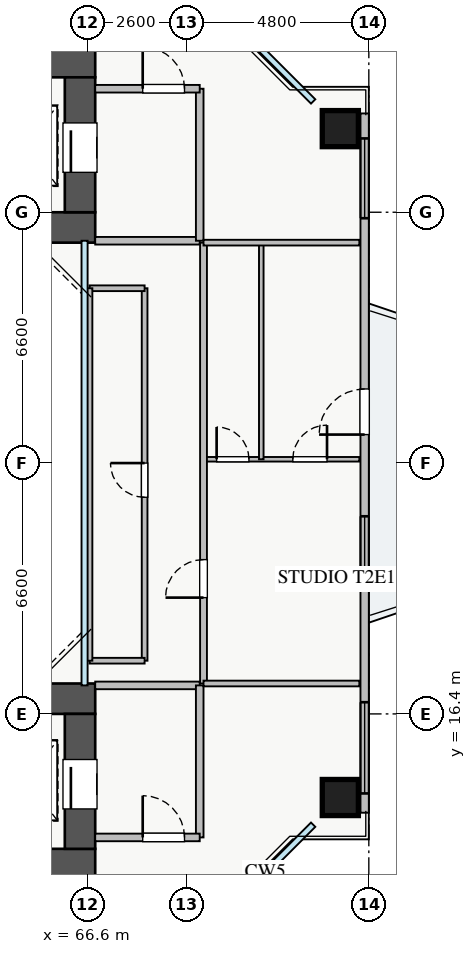
"""IFC4 building model, lengths in metres.
Left out: names, types, materials, properties, quantities, classifications, styles, units other than length and angle.
Written with IfcOpenShell. Run it as: python <this file> out.ifc"""

import sys

from ifc_helpers import new_model, si_unit, direction, frame, frame_2d, origin, origin_2d, place, context, subcontext, project, spatial, rectangle, extrude, source, transform, mapped, element, fill, save


model = new_model("IFC4")
c1 = context("Model", 3, precision=1e-05, world=origin(), true_north=direction((0.0, 1.0)))
c2 = subcontext(c1, "Body", "Model", "MODEL_VIEW")
j1 = project(units=[si_unit("LENGTHUNIT", "METRE"), si_unit("PLANEANGLEUNIT", "RADIAN")], contexts=[c1])
p1 = place(None, origin())
s1 = spatial("IfcSite", under=j1, at=p1, CompositionType="ELEMENT")
p2 = place(p1, origin())
s2 = spatial("IfcBuilding", under=s1, at=p2, CompositionType="ELEMENT")
p3 = place(p2, frame((0.0, 0.0, 53.5)))
s3 = spatial("IfcBuildingStorey", under=s2, at=p3, CompositionType="ELEMENT", Elevation=53.5)
p4 = place(p3, frame((54.2, 29.2, 0.0), z_axis=(0.0, 0.0, 1.0), x_axis=(1.0, 0.0, 0.0)))
e1 = element("IfcWall", 1, at=p4, inside=s3, PredefinedType="SHEAR", context=c2, shape_type="SweptSolid", body=[
    extrude(rectangle(XDim=12.6, YDim=0.8, at=frame_2d((6.3, 0.0))), origin(), (0.0, 0.0, 1.0), 3.25),
])
p5 = place(p3, frame((54.2, 33.55, 0.0), z_axis=(0.0, 0.0, 1.0), x_axis=(1.0, 0.0, 0.0)))
e2 = element("IfcWall", 2, at=p5, inside=s3, PredefinedType="SHEAR", context=c2, shape_type="SweptSolid", body=[
    extrude(rectangle(XDim=12.6, YDim=0.8, at=frame_2d((6.3, 0.0))), origin(), (0.0, 0.0, 1.0), 3.25),
])
p6 = place(p5, frame((8.2, 0.0, 0.0)))
e3 = element("IfcOpeningElement", 3, at=p6, cuts=e2, PredefinedType="OPENING", context=c2, shape_type="SweptSolid", body=[
    extrude(rectangle(XDim=1.1, YDim=2.05, at=frame_2d((0.55, 1.025))), frame((0.0, 0.41, 0.0), z_axis=(0.0, -1.0, 0.0), x_axis=(1.0, 0.0, 0.0)), (0.0, 0.0, 1.0), 0.82),
])
p7 = place(p3, frame((66.4, 29.6, 0.0), z_axis=(0.0, 0.0, 1.0), x_axis=(0.0, 1.0, 0.0)))
e4 = element("IfcWall", 4, at=p7, inside=s3, PredefinedType="SHEAR", context=c2, shape_type="SweptSolid", body=[
    extrude(rectangle(XDim=3.55, YDim=0.8, at=frame_2d((1.775, 0.0))), origin(), (0.0, 0.0, 1.0), 3.25),
])
p8 = place(p7, frame((1.05, 0.0, 0.0)))
e5 = element("IfcOpeningElement", 5, at=p8, cuts=e4, PredefinedType="OPENING", context=c2, shape_type="SweptSolid", body=[
    extrude(rectangle(XDim=1.3, YDim=2.05, at=frame_2d((0.65, 1.025))), frame((0.0, 0.41, 0.0), z_axis=(0.0, -1.0, 0.0), x_axis=(1.0, 0.0, 0.0)), (0.0, 0.0, 1.0), 0.82),
])
p9 = place(p3, frame((54.2, 12.45, 0.0), z_axis=(0.0, 0.0, 1.0), x_axis=(1.0, 0.0, 0.0)))
e6 = element("IfcWall", 6, at=p9, inside=s3, PredefinedType="SHEAR", context=c2, shape_type="SweptSolid", body=[
    extrude(rectangle(XDim=12.6, YDim=0.8, at=frame_2d((6.3, 0.0))), origin(), (0.0, 0.0, 1.0), 3.25),
])
p10 = place(p9, frame((8.2, 0.0, 0.0)))
e7 = element("IfcOpeningElement", 7, at=p10, cuts=e6, PredefinedType="OPENING", context=c2, shape_type="SweptSolid", body=[
    extrude(rectangle(XDim=1.1, YDim=2.05, at=frame_2d((0.55, 1.025))), frame((0.0, 0.41, 0.0), z_axis=(0.0, -1.0, 0.0), x_axis=(1.0, 0.0, 0.0)), (0.0, 0.0, 1.0), 0.82),
])
p11 = place(p3, frame((54.2, 16.8, 0.0), z_axis=(0.0, 0.0, 1.0), x_axis=(1.0, 0.0, 0.0)))
e8 = element("IfcWall", 8, at=p11, inside=s3, PredefinedType="SHEAR", context=c2, shape_type="SweptSolid", body=[
    extrude(rectangle(XDim=12.6, YDim=0.8, at=frame_2d((6.3, 0.0))), origin(), (0.0, 0.0, 1.0), 3.25),
])
p12 = place(p3, frame((66.4, 12.85, 0.0), z_axis=(0.0, 0.0, 1.0), x_axis=(0.0, 1.0, 0.0)))
e9 = element("IfcWall", 9, at=p12, inside=s3, PredefinedType="SHEAR", context=c2, shape_type="SweptSolid", body=[
    extrude(rectangle(XDim=3.55, YDim=0.8, at=frame_2d((1.775, 0.0))), origin(), (0.0, 0.0, 1.0), 3.25),
])
p13 = place(p12, frame((1.05, 0.0, 0.0)))
e10 = element("IfcOpeningElement", 10, at=p13, cuts=e9, PredefinedType="OPENING", context=c2, shape_type="SweptSolid", body=[
    extrude(rectangle(XDim=1.3, YDim=2.05, at=frame_2d((0.65, 1.025))), frame((0.0, 0.41, 0.0), z_axis=(0.0, -1.0, 0.0), x_axis=(1.0, 0.0, 0.0)), (0.0, 0.0, 1.0), 0.82),
])
m1 = source(origin(), c2, "Body", "SweptSolid", [
    extrude(rectangle(XDim=0.95, YDim=0.95, at=origin_2d()), origin(), (0.0, 0.0, 1.0), 3.25),
])
for number, where, z_axis, x_axis in (
    (11, (73.25, 14.2, 0.0), (0.0, 0.0, 1.0), (1.0, 0.0, 0.0)),
    (12, (73.25, 31.8, 0.0), (0.0, 0.0, 1.0), (1.0, 0.0, 0.0)),
):
    element("IfcColumn", number, at=place(p3, frame(where, z_axis=z_axis, x_axis=x_axis)), inside=s3, PredefinedType="COLUMN", context=c2, shape_type="MappedRepresentation", body=[
        mapped(m1, transform((0.0, 0.0, 0.0), x_axis=(1.0, 0.0, 0.0), y_axis=(0.0, 1.0, 0.0), z_axis=(0.0, 0.0, 1.0), scale=1.0)),
    ])
p14 = place(p3, frame((73.89, 13.8, 0.0), z_axis=(0.0, 0.0, 1.0), x_axis=(0.0, 1.0, 0.0)))
e13 = element("IfcWall", 13, at=p14, inside=s3, PredefinedType="STANDARD", context=c2, shape_type="SweptSolid", body=[
    extrude(rectangle(XDim=18.4, YDim=0.22, at=frame_2d((9.2, 0.0))), origin(), (0.0, 0.0, 1.0), 2.61),
])
p15 = place(p14, frame((9.95, 0.0, 0.0)))
e14 = element("IfcOpeningElement", 14, at=p15, cuts=e13, PredefinedType="OPENING", context=c2, shape_type="SweptSolid", body=[
    extrude(rectangle(XDim=1.2, YDim=2.1, at=frame_2d((0.6, 1.05))), frame((0.0, 0.12, 0.0), z_axis=(0.0, -1.0, 0.0), x_axis=(1.0, 0.0, 0.0)), (0.0, 0.0, 1.0), 0.24),
])
p16 = place(p14, frame((0.508, 0.0, 0.9)))
e15 = element("IfcOpeningElement", 15, at=p16, cuts=e13, PredefinedType="OPENING", context=c2, shape_type="SweptSolid", body=[
    extrude(rectangle(XDim=2.4, YDim=1.5, at=frame_2d((1.2, 0.75))), frame((0.0, 0.12, 0.0), z_axis=(0.0, -1.0, 0.0), x_axis=(1.0, 0.0, 0.0)), (0.0, 0.0, 1.0), 0.24),
])
p17 = place(p14, frame((6.0, 0.0, 0.9)))
e16 = element("IfcOpeningElement", 16, at=p17, cuts=e13, PredefinedType="OPENING", context=c2, shape_type="SweptSolid", body=[
    extrude(rectangle(XDim=1.8, YDim=1.45, at=frame_2d((0.9, 0.725))), frame((0.0, 0.12, 0.0), z_axis=(0.0, -1.0, 0.0), x_axis=(1.0, 0.0, 0.0)), (0.0, 0.0, 1.0), 0.24),
])
p18 = place(p14, frame((15.643, 0.0, 0.9)))
e17 = element("IfcOpeningElement", 17, at=p18, cuts=e13, PredefinedType="OPENING", context=c2, shape_type="SweptSolid", body=[
    extrude(rectangle(XDim=2.1, YDim=1.5, at=frame_2d((1.05, 0.75))), frame((0.0, 0.12, 0.0), z_axis=(0.0, -1.0, 0.0), x_axis=(1.0, 0.0, 0.0)), (0.0, 0.0, 1.0), 0.24),
])
p19 = place(p3, frame((66.8, 28.85, 0.0), z_axis=(0.0, 0.0, 1.0), x_axis=(1.0, 0.0, 0.0)))
e18 = element("IfcWall", 18, at=p19, inside=s3, PredefinedType="PARTITIONING", context=c2, shape_type="SweptSolid", body=[
    extrude(rectangle(XDim=2.75, YDim=0.2, at=frame_2d((1.375, 0.0))), origin(), (0.0, 0.0, 1.0), 3.07),
])
p20 = place(p3, frame((69.55, 28.85, 0.0), z_axis=(0.0, 0.0, 1.0), x_axis=(0.0, 1.0, 0.0)))
e19 = element("IfcWall", 19, at=p20, inside=s3, PredefinedType="PARTITIONING", context=c2, shape_type="SweptSolid", body=[
    extrude(rectangle(XDim=4.0, YDim=0.2, at=frame_2d((2.0, 0.0))), origin(), (0.0, 0.0, 1.0), 2.615),
])
p21 = place(p3, frame((66.8, 32.85, 0.0), z_axis=(0.0, 0.0, 1.0), x_axis=(1.0, 0.0, 0.0)))
e20 = element("IfcWall", 20, at=p21, inside=s3, PredefinedType="PARTITIONING", context=c2, shape_type="SweptSolid", body=[
    extrude(rectangle(XDim=2.75, YDim=0.2, at=frame_2d((1.375, 0.0))), origin(), (0.0, 0.0, 1.0), 3.07),
])
p22 = place(p21, frame((1.25, 0.0, 0.0)))
e21 = element("IfcOpeningElement", 21, at=p22, cuts=e20, PredefinedType="OPENING", context=c2, shape_type="SweptSolid", body=[
    extrude(rectangle(XDim=1.1, YDim=2.05, at=frame_2d((0.55, 1.025))), frame((0.0, 0.11, 0.0), z_axis=(0.0, -1.0, 0.0), x_axis=(1.0, 0.0, 0.0)), (0.0, 0.0, 1.0), 0.22),
])
p23 = place(p3, frame((66.8, 17.15, 0.0), z_axis=(0.0, 0.0, 1.0), x_axis=(1.0, 0.0, 0.0)))
e22 = element("IfcWall", 22, at=p23, inside=s3, PredefinedType="PARTITIONING", context=c2, shape_type="SweptSolid", body=[
    extrude(rectangle(XDim=2.75, YDim=0.2, at=frame_2d((1.375, 0.0))), origin(), (0.0, 0.0, 1.0), 3.07),
])
p24 = place(p3, frame((69.55, 13.15, 0.0), z_axis=(0.0, 0.0, 1.0), x_axis=(0.0, 1.0, 0.0)))
e23 = element("IfcWall", 23, at=p24, inside=s3, PredefinedType="PARTITIONING", context=c2, shape_type="SweptSolid", body=[
    extrude(rectangle(XDim=4.0, YDim=0.2, at=frame_2d((2.0, 0.0))), origin(), (0.0, 0.0, 1.0), 2.615),
])
p25 = place(p3, frame((66.8, 13.15, 0.0), z_axis=(0.0, 0.0, 1.0), x_axis=(1.0, 0.0, 0.0)))
e24 = element("IfcWall", 24, at=p25, inside=s3, PredefinedType="PARTITIONING", context=c2, shape_type="SweptSolid", body=[
    extrude(rectangle(XDim=2.75, YDim=0.2, at=frame_2d((1.375, 0.0))), origin(), (0.0, 0.0, 1.0), 3.07),
])
p26 = place(p25, frame((1.25, 0.0, 0.0)))
e25 = element("IfcOpeningElement", 25, at=p26, cuts=e24, PredefinedType="OPENING", context=c2, shape_type="SweptSolid", body=[
    extrude(rectangle(XDim=1.1, YDim=2.05, at=frame_2d((0.55, 1.025))), frame((0.0, 0.11, 0.0), z_axis=(0.0, -1.0, 0.0), x_axis=(1.0, 0.0, 0.0)), (0.0, 0.0, 1.0), 0.22),
])
p27 = place(p3, frame((69.65, 23.1, 0.0), z_axis=(0.0, 0.0, 1.0), x_axis=(1.0, 0.0, 0.0)))
e26 = element("IfcWall", 26, at=p27, inside=s3, PredefinedType="PLUMBINGWALL", context=c2, shape_type="SweptSolid", body=[
    extrude(rectangle(XDim=4.1, YDim=0.12, at=frame_2d((2.05, 0.0))), origin(), (0.0, 0.0, 1.0), 2.865),
])
p28 = place(p27, frame((0.345, 0.0, 0.0)))
e27 = element("IfcOpeningElement", 27, at=p28, cuts=e26, PredefinedType="OPENING", context=c2, shape_type="SweptSolid", body=[
    extrude(rectangle(XDim=0.85, YDim=2.05, at=frame_2d((0.425, 1.025))), frame((0.0, 0.07, 0.0), z_axis=(0.0, -1.0, 0.0), x_axis=(1.0, 0.0, 0.0)), (0.0, 0.0, 1.0), 0.14),
])
p29 = place(p27, frame((2.35, 0.0, 0.0)))
e28 = element("IfcOpeningElement", 28, at=p29, cuts=e26, PredefinedType="OPENING", context=c2, shape_type="SweptSolid", body=[
    extrude(rectangle(XDim=0.9, YDim=2.05, at=frame_2d((0.45, 1.025))), frame((0.0, 0.07, 0.0), z_axis=(0.0, -1.0, 0.0), x_axis=(1.0, 0.0, 0.0)), (0.0, 0.0, 1.0), 0.14),
])
p30 = place(p3, frame((71.17, 23.1, 0.0), z_axis=(0.0, 0.0, 1.0), x_axis=(0.0, 1.0, 0.0)))
e29 = element("IfcWall", 29, at=p30, inside=s3, PredefinedType="PLUMBINGWALL", context=c2, shape_type="SweptSolid", body=[
    extrude(rectangle(XDim=5.7, YDim=0.12, at=frame_2d((2.85, 0.0))), origin(), (0.0, 0.0, 1.0), 3.07),
])
p31 = place(p3, frame((69.65, 17.2, 0.0), z_axis=(0.0, 0.0, 1.0), x_axis=(0.0, 1.0, 0.0)))
e30 = element("IfcWall", 30, at=p31, inside=s3, PredefinedType="PARTITIONING", context=c2, shape_type="SweptSolid", body=[
    extrude(rectangle(XDim=11.6, YDim=0.18, at=frame_2d((5.8, 0.0))), origin(), (0.0, 0.0, 1.0), 3.07),
])
p32 = place(p31, frame((2.26, 0.0, 0.0)))
e31 = element("IfcOpeningElement", 31, at=p32, cuts=e30, PredefinedType="OPENING", context=c2, shape_type="SweptSolid", body=[
    extrude(rectangle(XDim=1.0, YDim=2.05, at=frame_2d((0.5, 1.025))), frame((0.0, 0.1, 0.0), z_axis=(0.0, -1.0, 0.0), x_axis=(1.0, 0.0, 0.0)), (0.0, 0.0, 1.0), 0.2),
])
for number, where, z_axis, x_axis in (
    (32, (69.65, 17.2, 0.0), (0.0, 0.0, 1.0), (1.0, 0.0, 0.0)),
    (33, (69.65, 28.8, 0.0), (0.0, 0.0, 1.0), (1.0, 0.0, 0.0)),
):
    element("IfcWall", number, at=place(p3, frame(where, z_axis=z_axis, x_axis=x_axis)), inside=s3, PredefinedType="PARTITIONING", context=c2, shape_type="SweptSolid", body=[
        extrude(rectangle(XDim=4.1, YDim=0.15, at=frame_2d((2.05, 0.0))), origin(), (0.0, 0.0, 1.0), 3.07),
    ])
p33 = place(p3, frame((68.1, 17.8, 0.0), z_axis=(0.0, 0.0, 1.0), x_axis=(0.0, 1.0, 0.0)))
e34 = element("IfcWall", 34, at=p33, inside=s3, PredefinedType="PARTITIONING", context=c2, shape_type="SweptSolid", body=[
    extrude(rectangle(XDim=9.8, YDim=0.15, at=frame_2d((4.9, 0.0))), origin(), (0.0, 0.0, 1.0), 3.07),
])
p34 = place(p33, frame((4.3, 0.0, 0.0)))
e35 = element("IfcOpeningElement", 35, at=p34, cuts=e34, PredefinedType="OPENING", context=c2, shape_type="SweptSolid", body=[
    extrude(rectangle(XDim=0.9, YDim=2.05, at=frame_2d((0.45, 1.025))), frame((0.0, 0.085, 0.0), z_axis=(0.0, -1.0, 0.0), x_axis=(1.0, 0.0, 0.0)), (0.0, 0.0, 1.0), 0.17),
])
p35 = place(p3, frame((66.65, 27.6, 0.0), z_axis=(0.0, 0.0, 1.0), x_axis=(1.0, 0.0, 0.0)))
e36 = element("IfcWall", 36, at=p35, inside=s3, PredefinedType="PARTITIONING", context=c2, shape_type="SweptSolid", body=[
    extrude(rectangle(XDim=1.45, YDim=0.15, at=frame_2d((0.725, 0.0))), origin(), (0.0, 0.0, 1.0), 2.865),
])
p36 = place(p3, frame((66.65, 17.8, 0.0), z_axis=(0.0, 0.0, 1.0), x_axis=(1.0, 0.0, 0.0)))
e37 = element("IfcWall", 37, at=p36, inside=s3, PredefinedType="PARTITIONING", context=c2, shape_type="SweptSolid", body=[
    extrude(rectangle(XDim=1.45, YDim=0.15, at=frame_2d((0.725, 0.0))), origin(), (0.0, 0.0, 1.0), 3.07),
])
p37 = place(p3, frame((66.65, 17.8, 0.0), z_axis=(0.0, 0.0, 1.0), x_axis=(0.0, 1.0, 0.0)))
e38 = element("IfcWall", 38, at=p37, inside=s3, PredefinedType="PARTITIONING", context=c2, shape_type="SweptSolid", body=[
    extrude(rectangle(XDim=9.8, YDim=0.15, at=frame_2d((4.9, 0.0))), origin(), (0.0, 0.0, 1.0), 2.665),
])
m2 = source(origin(), c2, "Body", "SweptSolid", [
    extrude(rectangle(XDim=1.2, YDim=2.1, at=frame_2d((0.6, 1.05))), frame((0.0, 0.025, 0.0), z_axis=(0.0, -1.0, 0.0), x_axis=(1.0, 0.0, 0.0)), (0.0, 0.0, 1.0), 0.05),
])
p38 = place(p15, origin())
e39 = element("IfcDoor", 39, at=p38, inside=s3, OperationType="SINGLE_SWING_LEFT", PredefinedType="DOOR", context=c2, shape_type="MappedRepresentation", body=[
    mapped(m2, transform((0.0, 0.0, 0.0), x_axis=(1.0, 0.0, 0.0), y_axis=(0.0, 1.0, 0.0), z_axis=(0.0, 0.0, 1.0), scale=1.0)),
])
fill(e14, e39)
m3 = source(origin(), c2, "Body", "SweptSolid", [
    extrude(rectangle(XDim=2.4, YDim=1.5, at=frame_2d((1.2, 0.75))), frame((0.0, 0.03, 0.0), z_axis=(0.0, -1.0, 0.0), x_axis=(1.0, 0.0, 0.0)), (0.0, 0.0, 1.0), 0.06),
])
p39 = place(p16, origin())
e40 = element("IfcWindow", 40, at=p39, inside=s3, PartitioningType="TRIPLE_PANEL_VERTICAL", PredefinedType="WINDOW", context=c2, shape_type="MappedRepresentation", body=[
    mapped(m3, transform((0.0, 0.0, 0.0), x_axis=(1.0, 0.0, 0.0), y_axis=(0.0, 1.0, 0.0), z_axis=(0.0, 0.0, 1.0), scale=1.0)),
])
fill(e15, e40)
m4 = source(origin(), c2, "Body", "SweptSolid", [
    extrude(rectangle(XDim=1.8, YDim=1.45, at=frame_2d((0.9, 0.725))), frame((0.0, 0.03, 0.0), z_axis=(0.0, -1.0, 0.0), x_axis=(1.0, 0.0, 0.0)), (0.0, 0.0, 1.0), 0.06),
])
p40 = place(p17, origin())
e41 = element("IfcWindow", 41, at=p40, inside=s3, PartitioningType="DOUBLE_PANEL_VERTICAL", PredefinedType="WINDOW", context=c2, shape_type="MappedRepresentation", body=[
    mapped(m4, transform((0.0, 0.0, 0.0), x_axis=(1.0, 0.0, 0.0), y_axis=(0.0, 1.0, 0.0), z_axis=(0.0, 0.0, 1.0), scale=1.0)),
])
fill(e16, e41)
m5 = source(origin(), c2, "Body", "SweptSolid", [
    extrude(rectangle(XDim=2.1, YDim=1.5, at=frame_2d((1.05, 0.75))), frame((0.0, 0.03, 0.0), z_axis=(0.0, -1.0, 0.0), x_axis=(1.0, 0.0, 0.0)), (0.0, 0.0, 1.0), 0.06),
])
p41 = place(p18, origin())
e42 = element("IfcWindow", 42, at=p41, inside=s3, PartitioningType="TRIPLE_PANEL_VERTICAL", PredefinedType="WINDOW", context=c2, shape_type="MappedRepresentation", body=[
    mapped(m5, transform((0.0, 0.0, 0.0), x_axis=(1.0, 0.0, 0.0), y_axis=(0.0, 1.0, 0.0), z_axis=(0.0, 0.0, 1.0), scale=1.0)),
])
fill(e17, e42)
m6 = source(origin(), c2, "Body", "SweptSolid", [
    extrude(rectangle(XDim=1.3, YDim=2.05, at=frame_2d((0.65, 1.025))), frame((0.0, 0.025, 0.0), z_axis=(0.0, -1.0, 0.0), x_axis=(1.0, 0.0, 0.0)), (0.0, 0.0, 1.0), 0.05),
])
p42 = place(p8, origin())
e43 = element("IfcDoor", 43, at=p42, inside=s3, OperationType="SLIDING_TO_LEFT", PredefinedType="DOOR", context=c2, shape_type="MappedRepresentation", body=[
    mapped(m6, transform((0.0, 0.0, 0.0), x_axis=(1.0, 0.0, 0.0), y_axis=(0.0, 1.0, 0.0), z_axis=(0.0, 0.0, 1.0), scale=1.0)),
])
fill(e5, e43)
p43 = place(p13, origin())
e44 = element("IfcDoor", 44, at=p43, inside=s3, OperationType="SLIDING_TO_RIGHT", PredefinedType="DOOR", context=c2, shape_type="MappedRepresentation", body=[
    mapped(m6, transform((0.0, 0.0, 0.0), x_axis=(1.0, 0.0, 0.0), y_axis=(0.0, 1.0, 0.0), z_axis=(0.0, 0.0, 1.0), scale=1.0)),
])
fill(e10, e44)
m7 = source(origin(), c2, "Body", "SweptSolid", [
    extrude(rectangle(XDim=1.1, YDim=2.05, at=frame_2d((0.55, 1.025))), frame((0.0, 0.025, 0.0), z_axis=(0.0, -1.0, 0.0), x_axis=(1.0, 0.0, 0.0)), (0.0, 0.0, 1.0), 0.05),
])
p44 = place(p22, origin())
e45 = element("IfcDoor", 45, at=p44, inside=s3, OperationType="SINGLE_SWING_LEFT", PredefinedType="DOOR", context=c2, shape_type="MappedRepresentation", body=[
    mapped(m7, transform((0.0, 0.0, 0.0), x_axis=(1.0, 0.0, 0.0), y_axis=(0.0, 1.0, 0.0), z_axis=(0.0, 0.0, 1.0), scale=1.0)),
])
fill(e21, e45)
p45 = place(p26, origin())
e46 = element("IfcDoor", 46, at=p45, inside=s3, OperationType="SINGLE_SWING_LEFT", PredefinedType="DOOR", context=c2, shape_type="MappedRepresentation", body=[
    mapped(m7, transform((0.0, 0.0, 0.0), x_axis=(1.0, 0.0, 0.0), y_axis=(0.0, 1.0, 0.0), z_axis=(0.0, 0.0, 1.0), scale=1.0)),
])
fill(e25, e46)
m8 = source(origin(), c2, "Body", "SweptSolid", [
    extrude(rectangle(XDim=0.85, YDim=2.05, at=frame_2d((0.425, 1.025))), frame((0.0, 0.025, 0.0), z_axis=(0.0, -1.0, 0.0), x_axis=(1.0, 0.0, 0.0)), (0.0, 0.0, 1.0), 0.05),
])
p46 = place(p28, origin())
e47 = element("IfcDoor", 47, at=p46, inside=s3, OperationType="SINGLE_SWING_LEFT", PredefinedType="DOOR", context=c2, shape_type="MappedRepresentation", body=[
    mapped(m8, transform((0.0, 0.0, 0.0), x_axis=(1.0, 0.0, 0.0), y_axis=(0.0, 1.0, 0.0), z_axis=(0.0, 0.0, 1.0), scale=1.0)),
])
fill(e27, e47)
m9 = source(origin(), c2, "Body", "SweptSolid", [
    extrude(rectangle(XDim=0.9, YDim=2.05, at=frame_2d((0.45, 1.025))), frame((0.0, 0.025, 0.0), z_axis=(0.0, -1.0, 0.0), x_axis=(1.0, 0.0, 0.0)), (0.0, 0.0, 1.0), 0.05),
])
p47 = place(p29, origin())
e48 = element("IfcDoor", 48, at=p47, inside=s3, OperationType="SINGLE_SWING_RIGHT", PredefinedType="DOOR", context=c2, shape_type="MappedRepresentation", body=[
    mapped(m9, transform((0.0, 0.0, 0.0), x_axis=(1.0, 0.0, 0.0), y_axis=(0.0, 1.0, 0.0), z_axis=(0.0, 0.0, 1.0), scale=1.0)),
])
fill(e28, e48)
m10 = source(origin(), c2, "Body", "SweptSolid", [
    extrude(rectangle(XDim=1.0, YDim=2.05, at=frame_2d((0.5, 1.025))), frame((0.0, 0.025, 0.0), z_axis=(0.0, -1.0, 0.0), x_axis=(1.0, 0.0, 0.0)), (0.0, 0.0, 1.0), 0.05),
])
p48 = place(p32, origin())
e49 = element("IfcDoor", 49, at=p48, inside=s3, OperationType="SINGLE_SWING_LEFT", PredefinedType="DOOR", context=c2, shape_type="MappedRepresentation", body=[
    mapped(m10, transform((0.0, 0.0, 0.0), x_axis=(1.0, 0.0, 0.0), y_axis=(0.0, 1.0, 0.0), z_axis=(0.0, 0.0, 1.0), scale=1.0)),
])
fill(e31, e49)
p49 = place(p34, origin())
e50 = element("IfcDoor", 50, at=p49, inside=s3, OperationType="SINGLE_SWING_RIGHT", PredefinedType="DOOR", context=c2, shape_type="MappedRepresentation", body=[
    mapped(m9, transform((0.0, 0.0, 0.0), x_axis=(1.0, 0.0, 0.0), y_axis=(0.0, 1.0, 0.0), z_axis=(0.0, 0.0, 1.0), scale=1.0)),
])
fill(e35, e50)
save(model, sys.argv[1])
